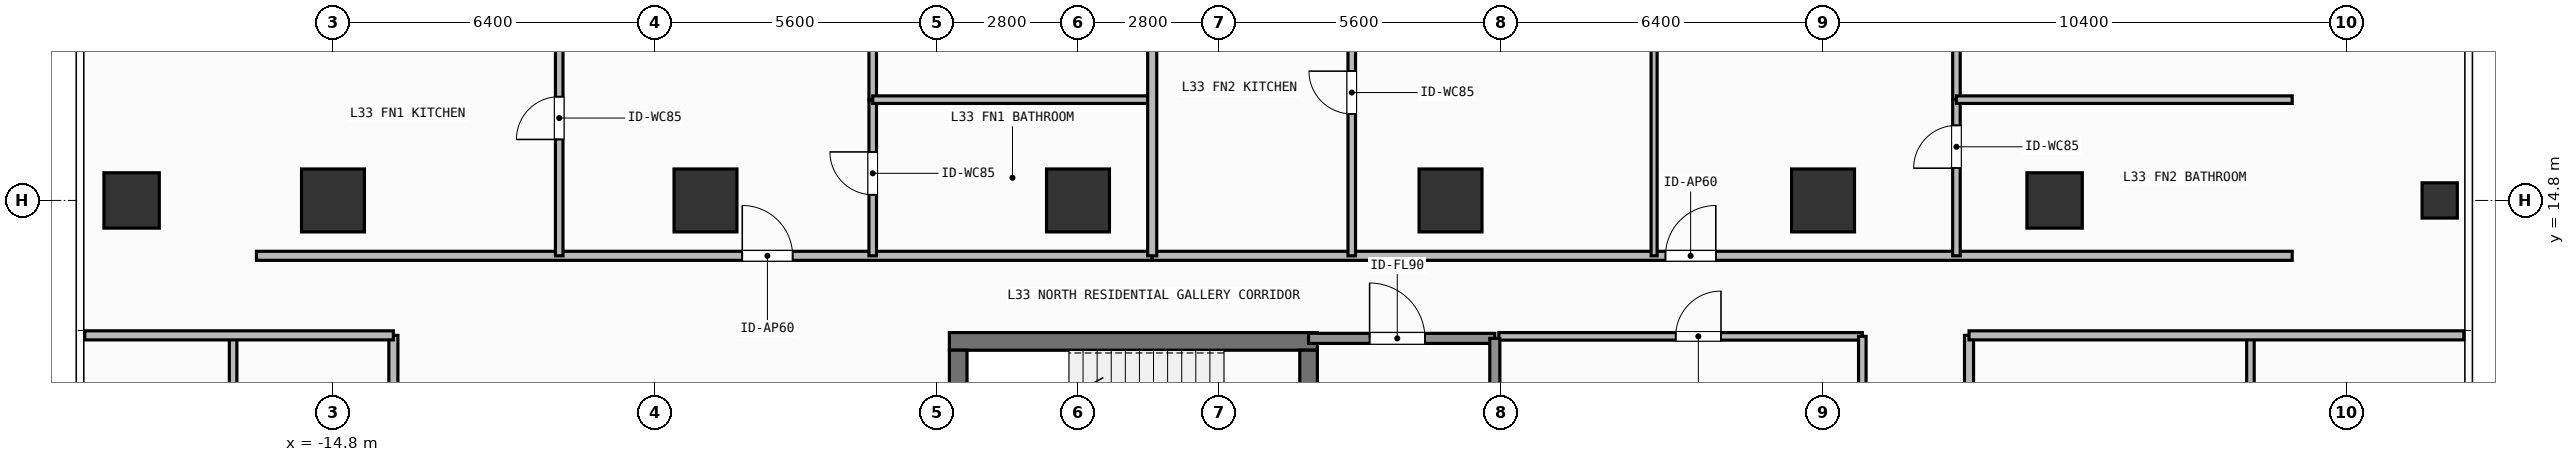
"""IFC4 building model, lengths in metres.
Left out: names, types, materials, properties, quantities, classifications, styles, units other than length and angle.
Written with IfcOpenShell. Run it as: python <this file> out.ifc"""

import sys

from ifc_helpers import new_model, si_unit, direction, frame, frame_2d, origin, origin_2d, place, context, subcontext, project, spatial, rectangle, hollow_rectangle, extrude, element, fill, save


model = new_model("IFC4")
c1 = context("Model", 3, precision=1e-05, world=origin(), true_north=direction((0.0, 1.0)))
c2 = subcontext(c1, "Body", "Model", "MODEL_VIEW")
j1 = project(units=[si_unit("LENGTHUNIT", "METRE"), si_unit("PLANEANGLEUNIT", "RADIAN")], contexts=[c1])
p1 = place(None, origin())
s1 = spatial("IfcSite", under=j1, at=p1, CompositionType="ELEMENT")
p2 = place(p1, origin())
s2 = spatial("IfcBuilding", under=s1, at=p2, CompositionType="ELEMENT")
p3 = place(p2, frame((0.0, 0.0, 132.9)))
s3 = spatial("IfcBuildingStorey", under=s2, at=p3, CompositionType="ELEMENT", Elevation=132.9)
p4 = place(p3, frame((-2.555, 12.0, 0.0), z_axis=(0.0, 0.0, 1.0), x_axis=(1.0, 0.0, 0.0)))
e1 = element("IfcWall", 1, at=p4, inside=s3, PredefinedType="SHEAR", context=c2, shape_type="SweptSolid", body=[
    extrude(rectangle(XDim=7.31, YDim=0.35, at=frame_2d((3.655, 0.0))), origin(), (0.0, 0.0, 1.0), 3.9),
])
p5 = place(p3, frame((-2.38, 8.9, 0.0), z_axis=(0.0, 0.0, 1.0), x_axis=(0.0, 1.0, 0.0)))
e2 = element("IfcWall", 2, at=p5, inside=s3, PredefinedType="SHEAR", context=c2, shape_type="SweptSolid", body=[
    extrude(rectangle(XDim=2.925, YDim=0.35, at=frame_2d((1.462, 0.0))), origin(), (0.0, 0.0, 1.0), 3.9),
])
p6 = place(p3, frame((4.58, 11.825, 0.0), z_axis=(0.0, 0.0, 1.0), x_axis=(0.0, -1.0, 0.0)))
e3 = element("IfcWall", 3, at=p6, inside=s3, PredefinedType="SHEAR", context=c2, shape_type="SweptSolid", body=[
    extrude(rectangle(XDim=2.925, YDim=0.35, at=frame_2d((1.462, 0.0))), origin(), (0.0, 0.0, 1.0), 3.9),
])
p7 = place(p6, frame((0.913, 0.0, 0.0)))
e4 = element("IfcOpeningElement", 4, at=p7, cuts=e3, PredefinedType="OPENING", context=c2, shape_type="SweptSolid", body=[
    extrude(rectangle(XDim=1.1, YDim=2.15, at=frame_2d((0.55, 1.075))), frame((0.0, 0.185, 0.0), z_axis=(0.0, -1.0, 0.0), x_axis=(1.0, 0.0, 0.0)), (0.0, 0.0, 1.0), 0.37),
])
for number, where, z_axis, x_axis in (
    (5, (-14.8, 14.8, 0.0), (0.0, 0.0, 1.0), (1.0, 0.0, 0.0)),
    (6, (-7.4, 14.8, 0.0), (0.0, 0.0, 1.0), (1.0, 0.0, 0.0)),
    (7, (0.0, 14.8, 0.0), (0.0, 0.0, 1.0), (1.0, 0.0, 0.0)),
    (8, (7.4, 14.8, 0.0), (0.0, 0.0, 1.0), (1.0, 0.0, 0.0)),
    (9, (14.8, 14.8, 0.0), (0.0, 0.0, 1.0), (1.0, 0.0, 0.0)),
):
    element("IfcColumn", number, at=place(p3, frame(where, z_axis=z_axis, x_axis=x_axis)), inside=s3, PredefinedType="COLUMN", context=c2, shape_type="SweptSolid", body=[
        extrude(rectangle(XDim=1.25, YDim=1.25, at=origin_2d()), origin(), (0.0, 0.0, 1.0), 3.9),
    ])
for number, where, z_axis, x_axis in (
    (10, (-18.8, 14.8, 0.0), (0.0, 0.0, 1.0), (1.0, 0.0, 0.0)),
    (11, (19.4, 14.8, 0.0), (0.0, 0.0, 1.0), (1.0, 0.0, 0.0)),
):
    element("IfcColumn", number, at=place(p3, frame(where, z_axis=z_axis, x_axis=x_axis)), inside=s3, PredefinedType="COLUMN", context=c2, shape_type="SweptSolid", body=[
        extrude(rectangle(XDim=1.1, YDim=1.1, at=origin_2d()), origin(), (0.0, 0.0, 1.0), 3.9),
    ])
p8 = place(p3, frame((27.05, 14.8, 0.0), z_axis=(0.0, 0.0, 1.0), x_axis=(1.0, 0.0, 0.0)))
e12 = element("IfcColumn", 12, at=p8, inside=s3, PredefinedType="COLUMN", context=c2, shape_type="SweptSolid", body=[
    extrude(hollow_rectangle(XDim=0.7, YDim=0.7, WallThickness=0.032, at=origin_2d()), origin(), (0.0, 0.0, 1.0), 3.9),
])
p9 = place(p3, frame((4.58, 12.06, 0.0), z_axis=(0.0, 0.0, 1.0), x_axis=(1.0, 0.0, 0.0)))
e13 = element("IfcWall", 13, at=p9, inside=s3, PredefinedType="SOLIDWALL", context=c2, shape_type="SweptSolid", body=[
    extrude(rectangle(XDim=3.7, YDim=0.2, at=frame_2d((1.85, 0.0))), origin(), (0.0, 0.0, 1.0), 3.62),
])
p10 = place(p9, frame((1.212, 0.0, 0.0)))
e14 = element("IfcOpeningElement", 14, at=p10, cuts=e13, PredefinedType="OPENING", context=c2, shape_type="SweptSolid", body=[
    extrude(rectangle(XDim=1.1, YDim=2.15, at=frame_2d((0.55, 1.075))), frame((0.0, 0.11, 0.0), z_axis=(0.0, -1.0, 0.0), x_axis=(1.0, 0.0, 0.0)), (0.0, 0.0, 1.0), 0.22),
])
p11 = place(p3, frame((8.36, 12.1, 0.0), z_axis=(0.0, 0.0, 1.0), x_axis=(1.0, 0.0, 0.0)))
e15 = element("IfcWall", 15, at=p11, inside=s3, PredefinedType="PARTITIONING", context=c2, shape_type="SweptSolid", body=[
    extrude(rectangle(XDim=7.22, YDim=0.15, at=frame_2d((3.61, 0.0))), origin(), (0.0, 0.0, 1.0), 3.62),
])
p12 = place(p11, frame((3.513, 0.0, 0.0)))
e16 = element("IfcOpeningElement", 16, at=p12, cuts=e15, PredefinedType="OPENING", context=c2, shape_type="SweptSolid", body=[
    extrude(rectangle(XDim=0.9, YDim=2.1, at=frame_2d((0.45, 1.05))), frame((0.0, 0.085, 0.0), z_axis=(0.0, -1.0, 0.0), x_axis=(1.0, 0.0, 0.0)), (0.0, 0.0, 1.0), 0.17),
])
p13 = place(p3, frame((-16.32, 13.7, 0.0), z_axis=(0.0, 0.0, 1.0), x_axis=(1.0, 0.0, 0.0)))
e17 = element("IfcWall", 17, at=p13, inside=s3, PredefinedType="PARTITIONING", context=c2, shape_type="SweptSolid", body=[
    extrude(rectangle(XDim=17.794, YDim=0.18, at=frame_2d((8.897, 0.0))), origin(), (0.0, 0.0, 1.0), 3.62),
])
p14 = place(p13, frame((9.65, 0.0, 0.0)))
e18 = element("IfcOpeningElement", 18, at=p14, cuts=e17, PredefinedType="OPENING", context=c2, shape_type="SweptSolid", body=[
    extrude(rectangle(XDim=1.0, YDim=2.2, at=frame_2d((0.5, 1.1))), frame((0.0, 0.1, 0.0), z_axis=(0.0, -1.0, 0.0), x_axis=(1.0, 0.0, 0.0)), (0.0, 0.0, 1.0), 0.2),
])
p15 = place(p3, frame((-10.306, 13.7, 0.0), z_axis=(0.0, 0.0, 1.0), x_axis=(0.0, 1.0, 0.0)))
e19 = element("IfcWall", 19, at=p15, inside=s3, PredefinedType="PARTITIONING", context=c2, shape_type="SweptSolid", body=[
    extrude(rectangle(XDim=5.653, YDim=0.15, at=frame_2d((2.827, 0.0))), origin(), (0.0, 0.0, 1.0), 3.62),
])
p16 = place(p15, frame((2.312, 0.0, 0.0)))
e20 = element("IfcOpeningElement", 20, at=p16, cuts=e19, PredefinedType="OPENING", context=c2, shape_type="SweptSolid", body=[
    extrude(rectangle(XDim=0.85, YDim=2.1, at=frame_2d((0.425, 1.05))), frame((0.0, 0.085, 0.0), z_axis=(0.0, -1.0, 0.0), x_axis=(1.0, 0.0, 0.0)), (0.0, 0.0, 1.0), 0.17),
])
p17 = place(p3, frame((-4.078, 13.7, 0.0), z_axis=(0.0, 0.0, 1.0), x_axis=(0.0, 1.0, 0.0)))
e21 = element("IfcWall", 21, at=p17, inside=s3, PredefinedType="PARTITIONING", context=c2, shape_type="SweptSolid", body=[
    extrude(rectangle(XDim=3.102, YDim=0.15, at=frame_2d((1.551, 0.0))), origin(), (0.0, 0.0, 1.0), 3.62),
])
p18 = place(p17, frame((1.214, 0.0, 0.0)))
e22 = element("IfcOpeningElement", 22, at=p18, cuts=e21, PredefinedType="OPENING", context=c2, shape_type="SweptSolid", body=[
    extrude(rectangle(XDim=0.85, YDim=2.1, at=frame_2d((0.425, 1.05))), frame((0.0, 0.085, 0.0), z_axis=(0.0, -1.0, 0.0), x_axis=(1.0, 0.0, 0.0)), (0.0, 0.0, 1.0), 0.17),
])
p19 = place(p3, frame((-4.078, 16.802, 0.0), z_axis=(0.0, 0.0, 1.0), x_axis=(0.0, 1.0, 0.0)))
e23 = element("IfcWall", 23, at=p19, inside=s3, PredefinedType="PARTITIONING", context=c2, shape_type="SweptSolid", body=[
    extrude(rectangle(XDim=3.562, YDim=0.15, at=frame_2d((1.781, 0.0))), origin(), (0.0, 0.0, 1.0), 3.62),
])
p20 = place(p19, frame((1.356, 0.0, 0.0)))
e24 = element("IfcOpeningElement", 24, at=p20, cuts=e23, PredefinedType="OPENING", context=c2, shape_type="SweptSolid", body=[
    extrude(rectangle(XDim=0.85, YDim=2.1, at=frame_2d((0.425, 1.05))), frame((0.0, 0.085, 0.0), z_axis=(0.0, -1.0, 0.0), x_axis=(1.0, 0.0, 0.0)), (0.0, 0.0, 1.0), 0.17),
])
p21 = place(p3, frame((1.474, 13.7, 0.0), z_axis=(0.0, 0.0, 1.0), x_axis=(1.0, 0.0, 0.0)))
e25 = element("IfcWall", 25, at=p21, inside=s3, PredefinedType="PARTITIONING", context=c2, shape_type="SweptSolid", body=[
    extrude(rectangle(XDim=22.646, YDim=0.18, at=frame_2d((11.323, 0.0))), origin(), (0.0, 0.0, 1.0), 3.62),
])
p22 = place(p21, frame((10.196, 0.0, 0.0)))
e26 = element("IfcOpeningElement", 26, at=p22, cuts=e25, PredefinedType="OPENING", context=c2, shape_type="SweptSolid", body=[
    extrude(rectangle(XDim=1.0, YDim=2.2, at=frame_2d((0.5, 1.1))), frame((0.0, 0.1, 0.0), z_axis=(0.0, -1.0, 0.0), x_axis=(1.0, 0.0, 0.0)), (0.0, 0.0, 1.0), 0.2),
])
p23 = place(p3, frame((11.444, 13.7, 0.0), z_axis=(0.0, 0.0, 1.0), x_axis=(0.0, 1.0, 0.0)))
e27 = element("IfcWall", 27, at=p23, inside=s3, PredefinedType="PARTITIONING", context=c2, shape_type="SweptSolid", body=[
    extrude(rectangle(XDim=11.49, YDim=0.12, at=frame_2d((5.745, 0.0))), origin(), (0.0, 0.0, 1.0), 3.62),
])
p24 = place(p23, frame((5.295, 0.0, 0.0)))
e28 = element("IfcOpeningElement", 28, at=p24, cuts=e27, PredefinedType="OPENING", context=c2, shape_type="SweptSolid", body=[
    extrude(rectangle(XDim=0.9, YDim=2.1, at=frame_2d((0.45, 1.05))), frame((0.0, 0.07, 0.0), z_axis=(0.0, -1.0, 0.0), x_axis=(1.0, 0.0, 0.0)), (0.0, 0.0, 1.0), 0.14),
])
p25 = place(p3, frame((5.438, 13.7, 0.0), z_axis=(0.0, 0.0, 1.0), x_axis=(0.0, 1.0, 0.0)))
e29 = element("IfcWall", 29, at=p25, inside=s3, PredefinedType="PARTITIONING", context=c2, shape_type="SweptSolid", body=[
    extrude(rectangle(XDim=6.664, YDim=0.15, at=frame_2d((3.332, 0.0))), origin(), (0.0, 0.0, 1.0), 3.62),
])
p26 = place(p25, frame((2.818, 0.0, 0.0)))
e30 = element("IfcOpeningElement", 30, at=p26, cuts=e29, PredefinedType="OPENING", context=c2, shape_type="SweptSolid", body=[
    extrude(rectangle(XDim=0.85, YDim=2.1, at=frame_2d((0.425, 1.05))), frame((0.0, 0.085, 0.0), z_axis=(0.0, -1.0, 0.0), x_axis=(1.0, 0.0, 0.0)), (0.0, 0.0, 1.0), 0.17),
])
p27 = place(p3, frame((17.45, 13.7, 0.0), z_axis=(0.0, 0.0, 1.0), x_axis=(0.0, 1.0, 0.0)))
e31 = element("IfcWall", 31, at=p27, inside=s3, PredefinedType="PARTITIONING", context=c2, shape_type="SweptSolid", body=[
    extrude(rectangle(XDim=3.102, YDim=0.15, at=frame_2d((1.551, 0.0))), origin(), (0.0, 0.0, 1.0), 3.62),
])
p28 = place(p27, frame((1.741, 0.0, 0.0)))
e32 = element("IfcOpeningElement", 32, at=p28, cuts=e31, PredefinedType="OPENING", context=c2, shape_type="SweptSolid", body=[
    extrude(rectangle(XDim=0.85, YDim=2.1, at=frame_2d((0.425, 1.05))), frame((0.0, 0.085, 0.0), z_axis=(0.0, -1.0, 0.0), x_axis=(1.0, 0.0, 0.0)), (0.0, 0.0, 1.0), 0.17),
])
p29 = place(p3, frame((17.45, 16.802, 0.0), z_axis=(0.0, 0.0, 1.0), x_axis=(0.0, 1.0, 0.0)))
e33 = element("IfcWall", 33, at=p29, inside=s3, PredefinedType="PARTITIONING", context=c2, shape_type="SweptSolid", body=[
    extrude(rectangle(XDim=3.562, YDim=0.15, at=frame_2d((1.781, 0.0))), origin(), (0.0, 0.0, 1.0), 3.62),
])
p30 = place(p29, frame((1.356, 0.0, 0.0)))
e34 = element("IfcOpeningElement", 34, at=p30, cuts=e33, PredefinedType="OPENING", context=c2, shape_type="SweptSolid", body=[
    extrude(rectangle(XDim=0.85, YDim=2.1, at=frame_2d((0.425, 1.05))), frame((0.0, 0.085, 0.0), z_axis=(0.0, -1.0, 0.0), x_axis=(1.0, 0.0, 0.0)), (0.0, 0.0, 1.0), 0.17),
])
p31 = place(p3, frame((-13.6, -12.12, 0.0), z_axis=(0.0, 0.0, 1.0), x_axis=(0.0, 1.0, 0.0)))
e35 = element("IfcWall", 35, at=p31, inside=s3, PredefinedType="PARTITIONING", context=c2, shape_type="SweptSolid", body=[
    extrude(rectangle(XDim=24.24, YDim=0.18, at=frame_2d((12.12, 0.0))), origin(), (0.0, 0.0, 1.0), 3.62),
])
p32 = place(p31, frame((11.62, 0.0, 0.0)))
e36 = element("IfcOpeningElement", 36, at=p32, cuts=e35, PredefinedType="OPENING", context=c2, shape_type="SweptSolid", body=[
    extrude(rectangle(XDim=1.0, YDim=2.2, at=frame_2d((0.5, 1.1))), frame((0.0, 0.1, 0.0), z_axis=(0.0, -1.0, 0.0), x_axis=(1.0, 0.0, 0.0)), (0.0, 0.0, 1.0), 0.2),
])
p33 = place(p3, frame((17.7, 1.309, 0.0), z_axis=(0.0, 0.0, 1.0), x_axis=(0.0, 1.0, 0.0)))
e37 = element("IfcWall", 37, at=p33, inside=s3, PredefinedType="PARTITIONING", context=c2, shape_type="SweptSolid", body=[
    extrude(rectangle(XDim=10.811, YDim=0.18, at=frame_2d((5.406, 0.0))), origin(), (0.0, 0.0, 1.0), 3.62),
])
p34 = place(p33, frame((4.458, 0.0, 0.0)))
e38 = element("IfcOpeningElement", 38, at=p34, cuts=e37, PredefinedType="OPENING", context=c2, shape_type="SweptSolid", body=[
    extrude(rectangle(XDim=1.0, YDim=2.2, at=frame_2d((0.5, 1.1))), frame((0.0, 0.1, 0.0), z_axis=(0.0, -1.0, 0.0), x_axis=(1.0, 0.0, 0.0)), (0.0, 0.0, 1.0), 0.2),
])
p35 = place(p3, frame((8.28, 8.875, 0.0), z_axis=(0.0, 0.0, 1.0), x_axis=(0.0, 1.0, 0.0)))
e39 = element("IfcWall", 39, at=p35, inside=s3, PredefinedType="SOLIDWALL", context=c2, shape_type="SweptSolid", body=[
    extrude(rectangle(XDim=3.185, YDim=0.2, at=frame_2d((1.593, 0.0))), origin(), (0.0, 0.0, 1.0), 3.62),
])
p36 = place(p3, frame((15.58, 5.85, 0.0), z_axis=(0.0, 0.0, 1.0), x_axis=(0.0, 1.0, 0.0)))
e40 = element("IfcWall", 40, at=p36, inside=s3, PredefinedType="PARTITIONING", context=c2, shape_type="SweptSolid", body=[
    extrude(rectangle(XDim=6.25, YDim=0.15, at=frame_2d((3.125, 0.0))), origin(), (0.0, 0.0, 1.0), 3.62),
])
p37 = place(p3, frame((-4.078, 16.802, 0.0), z_axis=(0.0, 0.0, 1.0), x_axis=(1.0, 0.0, 0.0)))
e41 = element("IfcWall", 41, at=p37, inside=s3, PredefinedType="PARTITIONING", context=c2, shape_type="SweptSolid", body=[
    extrude(rectangle(XDim=5.552, YDim=0.15, at=frame_2d((2.776, 0.0))), origin(), (0.0, 0.0, 1.0), 3.62),
])
p38 = place(p3, frame((17.45, 16.802, 0.0), z_axis=(0.0, 0.0, 1.0), x_axis=(1.0, 0.0, 0.0)))
e42 = element("IfcWall", 42, at=p38, inside=s3, PredefinedType="PARTITIONING", context=c2, shape_type="SweptSolid", body=[
    extrude(rectangle(XDim=6.67, YDim=0.15, at=frame_2d((3.335, 0.0))), origin(), (0.0, 0.0, 1.0), 3.62),
])
p39 = place(p3, frame((1.474, 13.7, 0.0), z_axis=(0.0, 0.0, 1.0), x_axis=(0.0, 1.0, 0.0)))
e43 = element("IfcWall", 43, at=p39, inside=s3, PredefinedType="PARTITIONING", context=c2, shape_type="SweptSolid", body=[
    extrude(rectangle(XDim=15.73, YDim=0.18, at=frame_2d((7.865, 0.0))), origin(), (0.0, 0.0, 1.0), 3.62),
])
p40 = place(p3, frame((-16.784, 5.449, 0.0), z_axis=(0.0, 0.0, 1.0), x_axis=(0.0, 1.0, 0.0)))
e44 = element("IfcWall", 44, at=p40, inside=s3, PredefinedType="PARTITIONING", context=c2, shape_type="SweptSolid", body=[
    extrude(rectangle(XDim=6.671, YDim=0.15, at=frame_2d((3.335, 0.0))), origin(), (0.0, 0.0, 1.0), 3.62),
])
p41 = place(p3, frame((-19.73, 12.12, 0.0), z_axis=(0.0, 0.0, 1.0), x_axis=(1.0, 0.0, 0.0)))
e45 = element("IfcWall", 45, at=p41, inside=s3, PredefinedType="PARTITIONING", context=c2, shape_type="SweptSolid", body=[
    extrude(rectangle(XDim=6.13, YDim=0.18, at=frame_2d((3.065, 0.0))), origin(), (0.0, 0.0, 1.0), 3.62),
])
p42 = place(p3, frame((23.29, 9.32, 0.0), z_axis=(0.0, 0.0, 1.0), x_axis=(0.0, 1.0, 0.0)))
e46 = element("IfcWall", 46, at=p42, inside=s3, PredefinedType="PARTITIONING", context=c2, shape_type="SweptSolid", body=[
    extrude(rectangle(XDim=2.8, YDim=0.15, at=frame_2d((1.4, 0.0))), origin(), (0.0, 0.0, 1.0), 3.62),
])
p43 = place(p3, frame((17.7, 12.12, 0.0), z_axis=(0.0, 0.0, 1.0), x_axis=(1.0, 0.0, 0.0)))
e47 = element("IfcWall", 47, at=p43, inside=s3, PredefinedType="PARTITIONING", context=c2, shape_type="SweptSolid", body=[
    extrude(rectangle(XDim=9.83, YDim=0.18, at=frame_2d((4.915, 0.0))), origin(), (0.0, 0.0, 1.0), 3.62),
])
p44 = place(p10, origin())
e48 = element("IfcDoor", 48, at=p44, inside=s3, OperationType="SINGLE_SWING_LEFT", PredefinedType="DOOR", context=c2, shape_type="SweptSolid", body=[
    extrude(rectangle(XDim=1.1, YDim=2.15, at=frame_2d((0.55, 1.075))), frame((0.0, 0.025, 0.0), z_axis=(0.0, -1.0, 0.0), x_axis=(1.0, 0.0, 0.0)), (0.0, 0.0, 1.0), 0.05),
])
fill(e14, e48)
p45 = place(p12, origin())
e49 = element("IfcDoor", 49, at=p45, inside=s3, OperationType="SINGLE_SWING_RIGHT", PredefinedType="DOOR", context=c2, shape_type="SweptSolid", body=[
    extrude(rectangle(XDim=0.9, YDim=2.1, at=frame_2d((0.45, 1.05))), frame((0.0, 0.025, 0.0), z_axis=(0.0, -1.0, 0.0), x_axis=(1.0, 0.0, 0.0)), (0.0, 0.0, 1.0), 0.05),
])
fill(e16, e49)
p46 = place(p14, origin())
e50 = element("IfcDoor", 50, at=p46, inside=s3, OperationType="SINGLE_SWING_LEFT", PredefinedType="DOOR", context=c2, shape_type="SweptSolid", body=[
    extrude(rectangle(XDim=1.0, YDim=2.2, at=frame_2d((0.5, 1.1))), frame((0.0, 0.025, 0.0), z_axis=(0.0, -1.0, 0.0), x_axis=(1.0, 0.0, 0.0)), (0.0, 0.0, 1.0), 0.05),
])
fill(e18, e50)
p47 = place(p16, origin())
e51 = element("IfcDoor", 51, at=p47, inside=s3, OperationType="SINGLE_SWING_LEFT", PredefinedType="DOOR", context=c2, shape_type="SweptSolid", body=[
    extrude(rectangle(XDim=0.85, YDim=2.1, at=frame_2d((0.425, 1.05))), frame((0.0, 0.025, 0.0), z_axis=(0.0, -1.0, 0.0), x_axis=(1.0, 0.0, 0.0)), (0.0, 0.0, 1.0), 0.05),
])
fill(e20, e51)
p48 = place(p18, origin())
e52 = element("IfcDoor", 52, at=p48, inside=s3, OperationType="SINGLE_SWING_RIGHT", PredefinedType="DOOR", context=c2, shape_type="SweptSolid", body=[
    extrude(rectangle(XDim=0.85, YDim=2.1, at=frame_2d((0.425, 1.05))), frame((0.0, 0.025, 0.0), z_axis=(0.0, -1.0, 0.0), x_axis=(1.0, 0.0, 0.0)), (0.0, 0.0, 1.0), 0.05),
])
fill(e22, e52)
p49 = place(p22, origin())
e53 = element("IfcDoor", 53, at=p49, inside=s3, OperationType="SINGLE_SWING_RIGHT", PredefinedType="DOOR", context=c2, shape_type="SweptSolid", body=[
    extrude(rectangle(XDim=1.0, YDim=2.2, at=frame_2d((0.5, 1.1))), frame((0.0, 0.025, 0.0), z_axis=(0.0, -1.0, 0.0), x_axis=(1.0, 0.0, 0.0)), (0.0, 0.0, 1.0), 0.05),
])
fill(e26, e53)
p50 = place(p26, origin())
e54 = element("IfcDoor", 54, at=p50, inside=s3, OperationType="SINGLE_SWING_RIGHT", PredefinedType="DOOR", context=c2, shape_type="SweptSolid", body=[
    extrude(rectangle(XDim=0.85, YDim=2.1, at=frame_2d((0.425, 1.05))), frame((0.0, 0.025, 0.0), z_axis=(0.0, -1.0, 0.0), x_axis=(1.0, 0.0, 0.0)), (0.0, 0.0, 1.0), 0.05),
])
fill(e30, e54)
p51 = place(p28, origin())
e55 = element("IfcDoor", 55, at=p51, inside=s3, OperationType="SINGLE_SWING_LEFT", PredefinedType="DOOR", context=c2, shape_type="SweptSolid", body=[
    extrude(rectangle(XDim=0.85, YDim=2.1, at=frame_2d((0.425, 1.05))), frame((0.0, 0.025, 0.0), z_axis=(0.0, -1.0, 0.0), x_axis=(1.0, 0.0, 0.0)), (0.0, 0.0, 1.0), 0.05),
])
fill(e32, e55)
save(model, sys.argv[1])
